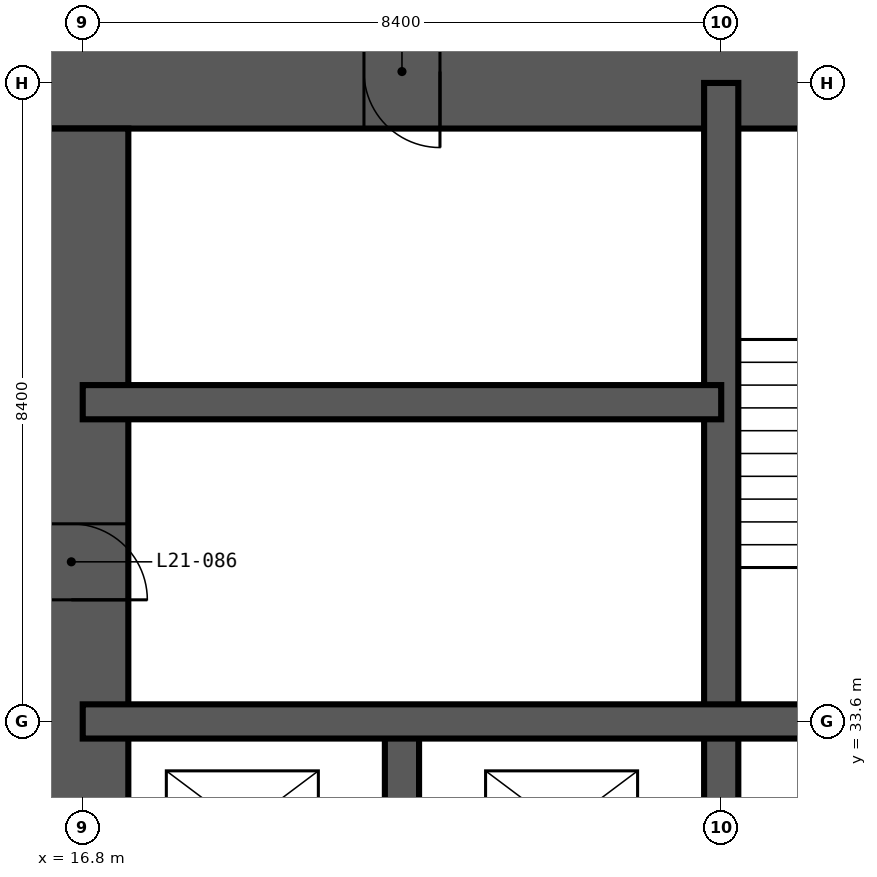
"""IFC4 building model, lengths in metres.
Left out: names, types, materials, properties, quantities, classifications, styles, units other than length and angle.
Written with IfcOpenShell. Run it as: python <this file> out.ifc"""

import sys

from ifc_helpers import new_model, si_unit, direction, frame, frame_2d, origin, place, context, subcontext, project, spatial, rectangle, extrude, element, fill, save


model = new_model("IFC4")
c1 = context("Model", 3, precision=1e-05, world=origin(), true_north=direction((0.0, 1.0)))
c2 = subcontext(c1, "Body", "Model", "MODEL_VIEW")
j1 = project(units=[si_unit("LENGTHUNIT", "METRE"), si_unit("PLANEANGLEUNIT", "RADIAN")], contexts=[c1])
p1 = place(None, origin())
s1 = spatial("IfcSite", under=j1, at=p1, CompositionType="ELEMENT")
p2 = place(p1, origin())
s2 = spatial("IfcBuilding", under=s1, at=p2, CompositionType="ELEMENT")
p3 = place(p2, frame((0.0, 0.0, 84.6)))
s3 = spatial("IfcBuildingStorey", under=s2, at=p3, CompositionType="ELEMENT", Elevation=84.6)
p4 = place(p3, frame((42.9, 42.15, -0.35), z_axis=(0.0, 0.0, 1.0), x_axis=(-1.0, 0.0, 0.0)))
e1 = element("IfcWall", 1, at=p4, inside=s3, PredefinedType="SHEAR", context=c2, shape_type="SweptSolid", body=[
    extrude(rectangle(XDim=27.0, YDim=1.5, at=frame_2d((13.5, 0.0))), origin(), (0.0, 0.0, 1.0), 3.55),
])
p5 = place(p4, frame((21.4, 0.0, 0.35)))
e2 = element("IfcOpeningElement", 2, at=p5, cuts=e1, PredefinedType="OPENING", context=c2, shape_type="SweptSolid", body=[
    extrude(rectangle(XDim=1.0, YDim=2.1, at=frame_2d((0.5, 1.05))), frame((0.0, 0.76, 0.0), z_axis=(0.0, -1.0, 0.0), x_axis=(1.0, 0.0, 0.0)), (0.0, 0.0, 1.0), 1.52),
])
p6 = place(p4, frame((10.8, 0.0, 0.35)))
e3 = element("IfcOpeningElement", 3, at=p6, cuts=e1, PredefinedType="OPENING", context=c2, shape_type="SweptSolid", body=[
    extrude(rectangle(XDim=1.2, YDim=2.2, at=frame_2d((0.6, 1.1))), frame((0.0, 0.76, 0.0), z_axis=(0.0, -1.0, 0.0), x_axis=(1.0, 0.0, 0.0)), (0.0, 0.0, 1.0), 1.52),
])
p7 = place(p3, frame((16.65, 41.4, -0.35), z_axis=(0.0, 0.0, 1.0), x_axis=(0.0, -1.0, 0.0)))
e4 = element("IfcWall", 4, at=p7, inside=s3, PredefinedType="SHEAR", context=c2, shape_type="SweptSolid", body=[
    extrude(rectangle(XDim=24.0, YDim=1.5, at=frame_2d((12.0, 0.0))), origin(), (0.0, 0.0, 1.0), 3.55),
])
p8 = place(p7, frame((11.1, 0.0, 0.35)))
e5 = element("IfcOpeningElement", 5, at=p8, cuts=e4, PredefinedType="OPENING", context=c2, shape_type="SweptSolid", body=[
    extrude(rectangle(XDim=1.8, YDim=2.2, at=frame_2d((0.9, 1.1))), frame((0.0, 0.76, 0.0), z_axis=(0.0, -1.0, 0.0), x_axis=(1.0, 0.0, 0.0)), (0.0, 0.0, 1.0), 1.52),
])
p9 = place(p7, frame((19.9, 0.0, 0.35)))
e6 = element("IfcOpeningElement", 6, at=p9, cuts=e4, PredefinedType="OPENING", context=c2, shape_type="SweptSolid", body=[
    extrude(rectangle(XDim=1.0, YDim=2.1, at=frame_2d((0.5, 1.05))), frame((0.0, 0.76, 0.0), z_axis=(0.0, -1.0, 0.0), x_axis=(1.0, 0.0, 0.0)), (0.0, 0.0, 1.0), 1.52),
])
p10 = place(p7, frame((5.2, 0.0, 0.35)))
e7 = element("IfcOpeningElement", 7, at=p10, cuts=e4, PredefinedType="OPENING", context=c2, shape_type="SweptSolid", body=[
    extrude(rectangle(XDim=1.0, YDim=2.1, at=frame_2d((0.5, 1.05))), frame((0.0, 0.76, 0.0), z_axis=(0.0, -1.0, 0.0), x_axis=(1.0, 0.0, 0.0)), (0.0, 0.0, 1.0), 1.52),
])
p11 = place(p3, frame((21.0, 30.8, -0.35), z_axis=(0.0, 0.0, 1.0), x_axis=(0.0, 1.0, 0.0)))
e8 = element("IfcWall", 8, at=p11, inside=s3, PredefinedType="SHEAR", context=c2, shape_type="SweptSolid", body=[
    extrude(rectangle(XDim=2.8, YDim=0.45, at=frame_2d((1.4, 0.0))), origin(), (0.0, 0.0, 1.0), 3.55),
])
for number, where, z_axis, x_axis in (
    (9, (25.2, 16.8, -0.35), (0.0, 0.0, 1.0), (0.0, 1.0, 0.0)),
    (10, (16.8, 33.6, -0.35), (0.0, 0.0, 1.0), (1.0, 0.0, 0.0)),
):
    element("IfcWall", number, at=place(p3, frame(where, z_axis=z_axis, x_axis=x_axis)), inside=s3, PredefinedType="SHEAR", context=c2, shape_type="SweptSolid", body=[
        extrude(rectangle(XDim=25.2, YDim=0.45, at=frame_2d((12.6, 0.0))), origin(), (0.0, 0.0, 1.0), 3.55),
    ])
p12 = place(p3, frame((16.8, 37.8, -0.35), z_axis=(0.0, 0.0, 1.0), x_axis=(1.0, 0.0, 0.0)))
e11 = element("IfcWall", 11, at=p12, inside=s3, PredefinedType="SHEAR", context=c2, shape_type="SweptSolid", body=[
    extrude(rectangle(XDim=8.4, YDim=0.45, at=frame_2d((4.2, 0.0))), origin(), (0.0, 0.0, 1.0), 3.55),
])
p13 = place(p10, origin())
e12 = element("IfcDoor", 12, at=p13, inside=s3, OperationType="SINGLE_SWING_RIGHT", PredefinedType="DOOR", context=c2, shape_type="SweptSolid", body=[
    extrude(rectangle(XDim=1.0, YDim=2.1, at=frame_2d((0.5, 1.05))), frame((0.0, 0.025, 0.0), z_axis=(0.0, -1.0, 0.0), x_axis=(1.0, 0.0, 0.0)), (0.0, 0.0, 1.0), 0.05),
])
fill(e7, e12)
p14 = place(p5, origin())
e13 = element("IfcDoor", 13, at=p14, inside=s3, OperationType="SINGLE_SWING_LEFT", PredefinedType="DOOR", context=c2, shape_type="SweptSolid", body=[
    extrude(rectangle(XDim=1.0, YDim=2.1, at=frame_2d((0.5, 1.05))), frame((0.0, 0.025, 0.0), z_axis=(0.0, -1.0, 0.0), x_axis=(1.0, 0.0, 0.0)), (0.0, 0.0, 1.0), 0.05),
])
fill(e2, e13)
save(model, sys.argv[1])
